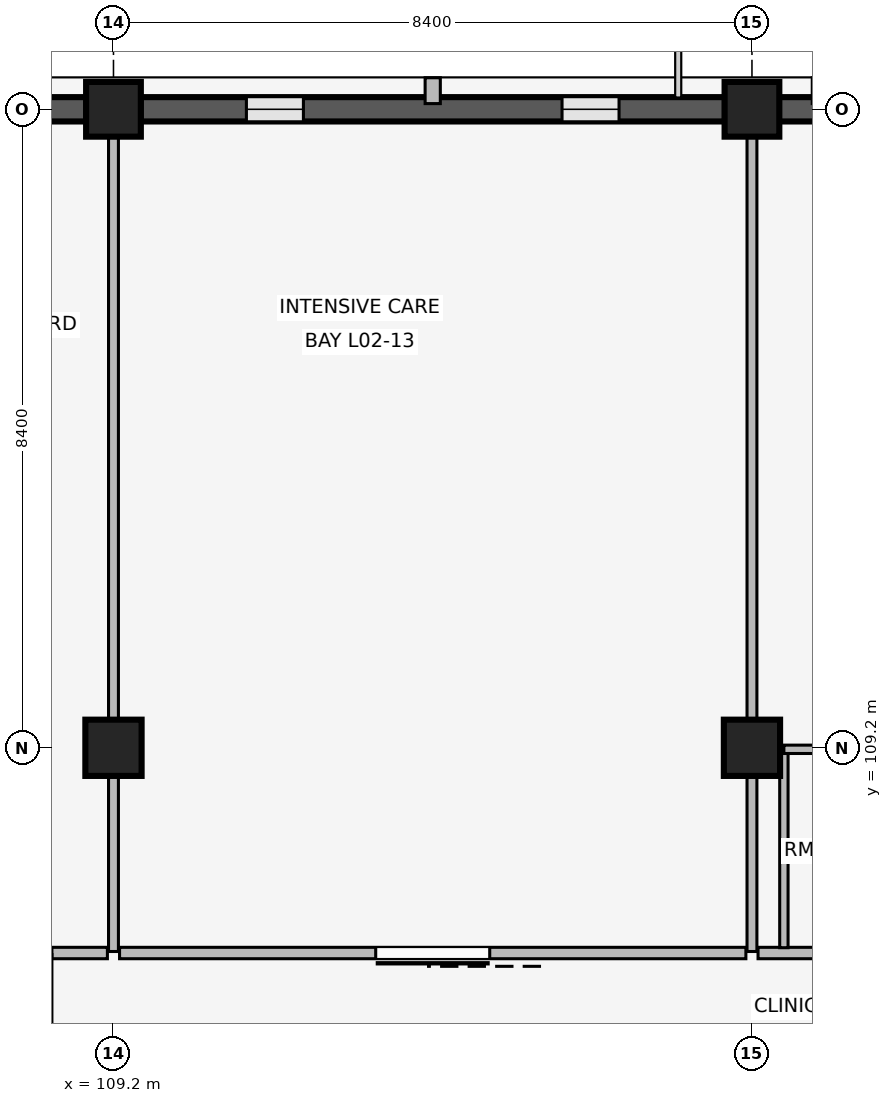
"""IFC4 building model, lengths in metres.
Left out: names, types, materials, properties, quantities, classifications, styles, units other than length and angle.
Written with IfcOpenShell. Run it as: python <this file> out.ifc"""

import sys

from ifc_helpers import new_model, si_unit, direction, frame, frame_2d, origin, origin_2d, place, context, subcontext, project, spatial, rectangle, extrude, element, fill, save


model = new_model("IFC4")
c1 = context("Model", 3, precision=1e-05, world=origin(), true_north=direction((0.0, 1.0)))
c2 = subcontext(c1, "Body", "Model", "MODEL_VIEW")
j1 = project(units=[si_unit("LENGTHUNIT", "METRE"), si_unit("PLANEANGLEUNIT", "RADIAN")], contexts=[c1])
p1 = place(None, origin())
s1 = spatial("IfcSite", under=j1, at=p1, CompositionType="ELEMENT")
p2 = place(p1, origin())
s2 = spatial("IfcBuilding", under=s1, at=p2, CompositionType="ELEMENT")
p3 = place(p2, frame((0.0, 0.0, 8.1)))
s3 = spatial("IfcBuildingStorey", under=s2, at=p3, CompositionType="ELEMENT", Elevation=8.1)
p4 = place(p3, frame((109.2, 109.2, 0.0), z_axis=(0.0, 0.0, 1.0), x_axis=(1.0, 0.0, 0.0)))
e1 = element("IfcColumn", 1, at=p4, inside=s3, PredefinedType="COLUMN", context=c2, shape_type="SweptSolid", body=[
    extrude(rectangle(XDim=0.74, YDim=0.74, at=origin_2d()), origin(), (0.0, 0.0, 1.0), 4.8),
])
p5 = place(p3, frame((109.2, 117.6, 0.0), z_axis=(0.0, 0.0, 1.0), x_axis=(1.0, 0.0, 0.0)))
e2 = element("IfcColumn", 2, at=p5, inside=s3, PredefinedType="COLUMN", context=c2, shape_type="SweptSolid", body=[
    extrude(rectangle(XDim=0.72, YDim=0.72, at=origin_2d()), origin(), (0.0, 0.0, 1.0), 4.8),
])
p6 = place(p3, frame((117.6, 109.2, 0.0), z_axis=(0.0, 0.0, 1.0), x_axis=(1.0, 0.0, 0.0)))
e3 = element("IfcColumn", 3, at=p6, inside=s3, PredefinedType="COLUMN", context=c2, shape_type="SweptSolid", body=[
    extrude(rectangle(XDim=0.74, YDim=0.74, at=origin_2d()), origin(), (0.0, 0.0, 1.0), 4.8),
])
p7 = place(p3, frame((117.6, 117.6, 0.0), z_axis=(0.0, 0.0, 1.0), x_axis=(1.0, 0.0, 0.0)))
e4 = element("IfcColumn", 4, at=p7, inside=s3, PredefinedType="COLUMN", context=c2, shape_type="SweptSolid", body=[
    extrude(rectangle(XDim=0.72, YDim=0.72, at=origin_2d()), origin(), (0.0, 0.0, 1.0), 4.8),
])
p8 = place(p3, frame((101.155, 117.6, 0.0), z_axis=(0.0, 0.0, 1.0), x_axis=(1.0, 0.0, 0.0)))
e5 = element("IfcWall", 5, at=p8, inside=s3, PredefinedType="SOLIDWALL", context=c2, shape_type="SweptSolid", body=[
    extrude(rectangle(XDim=7.69, YDim=0.32, at=frame_2d((3.845, 0.0))), origin(), (0.0, 0.0, 1.0), 3.86),
])
p9 = place(p8, frame((1.169, 0.0, 0.85)))
e6 = element("IfcOpeningElement", 6, at=p9, cuts=e5, PredefinedType="OPENING", context=c2, shape_type="SweptSolid", body=[
    extrude(rectangle(XDim=1.2, YDim=1.55, at=frame_2d((0.6, 0.775))), frame((0.0, 0.17, 0.0), z_axis=(0.0, -1.0, 0.0), x_axis=(1.0, 0.0, 0.0)), (0.0, 0.0, 1.0), 0.34),
])
p10 = place(p8, frame((5.321, 0.0, 0.85)))
e7 = element("IfcOpeningElement", 7, at=p10, cuts=e5, PredefinedType="OPENING", context=c2, shape_type="SweptSolid", body=[
    extrude(rectangle(XDim=1.2, YDim=1.55, at=frame_2d((0.6, 0.775))), frame((0.0, 0.17, 0.0), z_axis=(0.0, -1.0, 0.0), x_axis=(1.0, 0.0, 0.0)), (0.0, 0.0, 1.0), 0.34),
])
p11 = place(p3, frame((109.555, 117.6, 0.0), z_axis=(0.0, 0.0, 1.0), x_axis=(1.0, 0.0, 0.0)))
e8 = element("IfcWall", 8, at=p11, inside=s3, PredefinedType="SOLIDWALL", context=c2, shape_type="SweptSolid", body=[
    extrude(rectangle(XDim=7.69, YDim=0.32, at=frame_2d((3.845, 0.0))), origin(), (0.0, 0.0, 1.0), 3.86),
])
p12 = place(p11, frame((1.394, 0.0, 0.85)))
e9 = element("IfcOpeningElement", 9, at=p12, cuts=e8, PredefinedType="OPENING", context=c2, shape_type="SweptSolid", body=[
    extrude(rectangle(XDim=0.75, YDim=1.85, at=frame_2d((0.375, 0.925))), frame((0.0, 0.17, 0.0), z_axis=(0.0, -1.0, 0.0), x_axis=(1.0, 0.0, 0.0)), (0.0, 0.0, 1.0), 0.34),
])
p13 = place(p11, frame((5.546, 0.0, 0.85)))
e10 = element("IfcOpeningElement", 10, at=p13, cuts=e8, PredefinedType="OPENING", context=c2, shape_type="SweptSolid", body=[
    extrude(rectangle(XDim=0.75, YDim=1.85, at=frame_2d((0.375, 0.925))), frame((0.0, 0.17, 0.0), z_axis=(0.0, -1.0, 0.0), x_axis=(1.0, 0.0, 0.0)), (0.0, 0.0, 1.0), 0.34),
])
p14 = place(p3, frame((113.4, 117.675, 0.0), z_axis=(0.0, 0.0, 1.0), x_axis=(0.0, 1.0, 0.0)))
e11 = element("IfcWall", 11, at=p14, inside=s3, PredefinedType="ELEMENTEDWALL", context=c2, shape_type="SweptSolid", body=[
    extrude(rectangle(XDim=0.34, YDim=0.2, at=frame_2d((0.17, 0.0))), origin(), (0.0, 0.0, 1.0), 3.84),
])
p15 = place(p3, frame((117.955, 117.6, 0.0), z_axis=(0.0, 0.0, 1.0), x_axis=(1.0, 0.0, 0.0)))
e12 = element("IfcWall", 12, at=p15, inside=s3, PredefinedType="SOLIDWALL", context=c2, shape_type="SweptSolid", body=[
    extrude(rectangle(XDim=7.69, YDim=0.32, at=frame_2d((3.845, 0.0))), origin(), (0.0, 0.0, 1.0), 3.86),
])
p16 = place(p15, frame((1.444, 0.0, 0.85)))
e13 = element("IfcOpeningElement", 13, at=p16, cuts=e12, PredefinedType="OPENING", context=c2, shape_type="SweptSolid", body=[
    extrude(rectangle(XDim=0.65, YDim=1.75, at=frame_2d((0.325, 0.875))), frame((0.0, 0.17, 0.0), z_axis=(0.0, -1.0, 0.0), x_axis=(1.0, 0.0, 0.0)), (0.0, 0.0, 1.0), 0.34),
])
p17 = place(p15, frame((5.596, 0.0, 0.85)))
e14 = element("IfcOpeningElement", 14, at=p17, cuts=e12, PredefinedType="OPENING", context=c2, shape_type="SweptSolid", body=[
    extrude(rectangle(XDim=0.65, YDim=1.75, at=frame_2d((0.325, 0.875))), frame((0.0, 0.17, 0.0), z_axis=(0.0, -1.0, 0.0), x_axis=(1.0, 0.0, 0.0)), (0.0, 0.0, 1.0), 0.34),
])
p18 = place(p3, frame((118.493, 117.675, 0.0), z_axis=(0.0, 0.0, 1.0), x_axis=(0.0, 1.0, 0.0)))
e15 = element("IfcWall", 15, at=p18, inside=s3, PredefinedType="ELEMENTEDWALL", context=c2, shape_type="SweptSolid", body=[
    extrude(rectangle(XDim=0.34, YDim=0.2, at=frame_2d((0.17, 0.0))), origin(), (0.0, 0.0, 1.0), 3.84),
])
p19 = place(p3, frame((109.12, 106.5, 0.0), z_axis=(0.0, 0.0, 1.0), x_axis=(-1.0, 0.0, 0.0)))
e16 = element("IfcWall", 16, at=p19, inside=s3, PredefinedType="PARTITIONING", context=c2, shape_type="SweptSolid", body=[
    extrude(rectangle(XDim=8.24, YDim=0.15, at=frame_2d((4.12, 0.0))), origin(), (0.0, 0.0, 1.0), 3.84),
])
p20 = place(p19, frame((0.73, 0.0, 0.0)))
e17 = element("IfcOpeningElement", 17, at=p20, cuts=e16, PredefinedType="OPENING", context=c2, shape_type="SweptSolid", body=[
    extrude(rectangle(XDim=1.3, YDim=2.25, at=frame_2d((0.65, 1.125))), frame((0.0, 0.085, 0.0), z_axis=(0.0, -1.0, 0.0), x_axis=(1.0, 0.0, 0.0)), (0.0, 0.0, 1.0), 0.17),
])
p21 = place(p19, frame((4.43, 0.0, 0.0)))
e18 = element("IfcOpeningElement", 18, at=p21, cuts=e16, PredefinedType="OPENING", context=c2, shape_type="SweptSolid", body=[
    extrude(rectangle(XDim=1.3, YDim=2.25, at=frame_2d((0.65, 1.125))), frame((0.0, 0.085, 0.0), z_axis=(0.0, -1.0, 0.0), x_axis=(1.0, 0.0, 0.0)), (0.0, 0.0, 1.0), 0.17),
])
p22 = place(p3, frame((109.2, 106.52, 0.0), z_axis=(0.0, 0.0, 1.0), x_axis=(0.0, 1.0, 0.0)))
e19 = element("IfcWall", 19, at=p22, inside=s3, PredefinedType="PARTITIONING", context=c2, shape_type="SweptSolid", body=[
    extrude(rectangle(XDim=10.94, YDim=0.13, at=frame_2d((5.47, 0.0))), origin(), (0.0, 0.0, 1.0), 3.84),
])
p23 = place(p3, frame((117.52, 106.5, 0.0), z_axis=(0.0, 0.0, 1.0), x_axis=(-1.0, 0.0, 0.0)))
e20 = element("IfcWall", 20, at=p23, inside=s3, PredefinedType="PARTITIONING", context=c2, shape_type="SweptSolid", body=[
    extrude(rectangle(XDim=8.24, YDim=0.15, at=frame_2d((4.12, 0.0))), origin(), (0.0, 0.0, 1.0), 3.84),
])
p24 = place(p23, frame((3.37, 0.0, 0.0)))
e21 = element("IfcOpeningElement", 21, at=p24, cuts=e20, PredefinedType="OPENING", context=c2, shape_type="SweptSolid", body=[
    extrude(rectangle(XDim=1.5, YDim=2.3, at=frame_2d((0.75, 1.15))), frame((0.0, 0.085, 0.0), z_axis=(0.0, -1.0, 0.0), x_axis=(1.0, 0.0, 0.0)), (0.0, 0.0, 1.0), 0.17),
])
p25 = place(p3, frame((117.6, 106.52, 0.0), z_axis=(0.0, 0.0, 1.0), x_axis=(0.0, 1.0, 0.0)))
e22 = element("IfcWall", 22, at=p25, inside=s3, PredefinedType="PARTITIONING", context=c2, shape_type="SweptSolid", body=[
    extrude(rectangle(XDim=10.94, YDim=0.13, at=frame_2d((5.47, 0.0))), origin(), (0.0, 0.0, 1.0), 3.84),
])
p26 = place(p3, frame((125.92, 106.5, 0.0), z_axis=(0.0, 0.0, 1.0), x_axis=(-1.0, 0.0, 0.0)))
e23 = element("IfcWall", 23, at=p26, inside=s3, PredefinedType="PARTITIONING", context=c2, shape_type="SweptSolid", body=[
    extrude(rectangle(XDim=8.24, YDim=0.15, at=frame_2d((4.12, 0.0))), origin(), (0.0, 0.0, 1.0), 3.84),
])
p27 = place(p26, frame((0.73, 0.0, 0.0)))
e24 = element("IfcOpeningElement", 24, at=p27, cuts=e23, PredefinedType="OPENING", context=c2, shape_type="SweptSolid", body=[
    extrude(rectangle(XDim=1.3, YDim=2.25, at=frame_2d((0.65, 1.125))), frame((0.0, 0.085, 0.0), z_axis=(0.0, -1.0, 0.0), x_axis=(1.0, 0.0, 0.0)), (0.0, 0.0, 1.0), 0.17),
])
p28 = place(p26, frame((4.43, 0.0, 0.0)))
e25 = element("IfcOpeningElement", 25, at=p28, cuts=e23, PredefinedType="OPENING", context=c2, shape_type="SweptSolid", body=[
    extrude(rectangle(XDim=1.3, YDim=2.25, at=frame_2d((0.65, 1.125))), frame((0.0, 0.085, 0.0), z_axis=(0.0, -1.0, 0.0), x_axis=(1.0, 0.0, 0.0)), (0.0, 0.0, 1.0), 0.17),
])
p29 = place(p3, frame((118.02, 106.57, 0.0), z_axis=(0.0, 0.0, 1.0), x_axis=(0.0, 1.0, 0.0)))
e26 = element("IfcWall", 26, at=p29, inside=s3, PredefinedType="PARTITIONING", context=c2, shape_type="SweptSolid", body=[
    extrude(rectangle(XDim=2.61, YDim=0.11, at=frame_2d((1.305, 0.0))), origin(), (0.0, 0.0, 1.0), 3.84),
])
p30 = place(p3, frame((118.02, 109.18, 0.0), z_axis=(0.0, 0.0, 1.0), x_axis=(1.0, 0.0, 0.0)))
e27 = element("IfcWall", 27, at=p30, inside=s3, PredefinedType="PARTITIONING", context=c2, shape_type="SweptSolid", body=[
    extrude(rectangle(XDim=1.98, YDim=0.11, at=frame_2d((0.99, 0.0))), origin(), (0.0, 0.0, 1.0), 3.84),
])
p31 = place(p30, frame((0.54, 0.0, 0.0)))
e28 = element("IfcOpeningElement", 28, at=p31, cuts=e27, PredefinedType="OPENING", context=c2, shape_type="SweptSolid", body=[
    extrude(rectangle(XDim=0.9, YDim=2.1, at=frame_2d((0.45, 1.05))), frame((0.0, 0.065, 0.0), z_axis=(0.0, -1.0, 0.0), x_axis=(1.0, 0.0, 0.0)), (0.0, 0.0, 1.0), 0.13),
])
p32 = place(p12, origin())
e29 = element("IfcWindow", 29, at=p32, inside=s3, PartitioningType="SINGLE_PANEL", PredefinedType="WINDOW", context=c2, shape_type="SweptSolid", body=[
    extrude(rectangle(XDim=0.75, YDim=1.85, at=frame_2d((0.375, 0.925))), frame((0.0, 0.03, 0.0), z_axis=(0.0, -1.0, 0.0), x_axis=(1.0, 0.0, 0.0)), (0.0, 0.0, 1.0), 0.06),
])
fill(e9, e29)
p33 = place(p13, origin())
e30 = element("IfcWindow", 30, at=p33, inside=s3, PartitioningType="SINGLE_PANEL", PredefinedType="WINDOW", context=c2, shape_type="SweptSolid", body=[
    extrude(rectangle(XDim=0.75, YDim=1.85, at=frame_2d((0.375, 0.925))), frame((0.0, 0.03, 0.0), z_axis=(0.0, -1.0, 0.0), x_axis=(1.0, 0.0, 0.0)), (0.0, 0.0, 1.0), 0.06),
])
fill(e10, e30)
p34 = place(p24, origin())
e31 = element("IfcDoor", 31, at=p34, inside=s3, OperationType="SLIDING_TO_LEFT", PredefinedType="DOOR", context=c2, shape_type="SweptSolid", body=[
    extrude(rectangle(XDim=1.5, YDim=2.3, at=frame_2d((0.75, 1.15))), frame((0.0, 0.025, 0.0), z_axis=(0.0, -1.0, 0.0), x_axis=(1.0, 0.0, 0.0)), (0.0, 0.0, 1.0), 0.05),
])
fill(e21, e31)
save(model, sys.argv[1])
